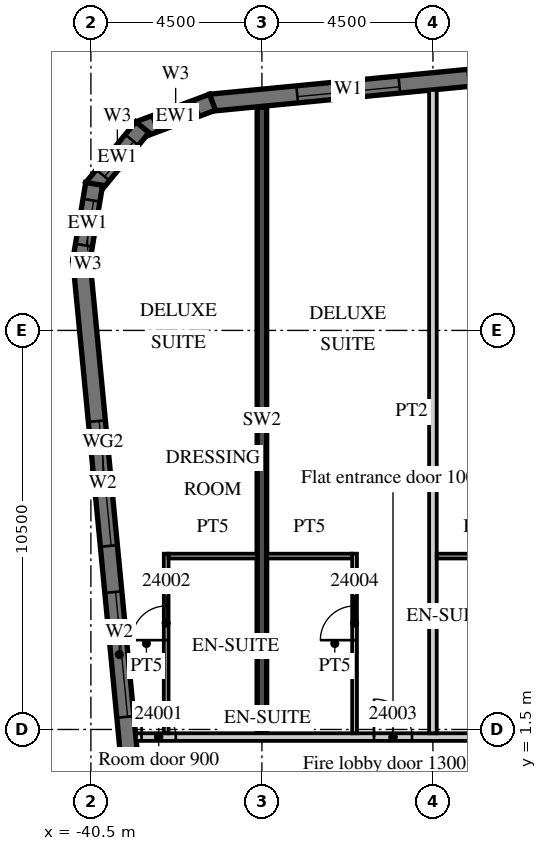
"""IFC4 building model, lengths in metres.
Left out: names, types, materials, properties, quantities, classifications, styles, units other than length and angle.
Written with IfcOpenShell. Run it as: python <this file> out.ifc"""

import sys

from ifc_helpers import new_model, si_unit, direction, frame, frame_2d, origin, place, context, subcontext, project, spatial, polyline, rectangle, outline, extrude, element, fill, save


model = new_model("IFC4")
c1 = context("Model", 3, precision=1e-05, world=origin(), true_north=direction((0.0, 1.0)))
c2 = subcontext(c1, "Body", "Model", "MODEL_VIEW")
j1 = project(units=[si_unit("LENGTHUNIT", "METRE"), si_unit("PLANEANGLEUNIT", "RADIAN")], contexts=[c1])
p1 = place(None, origin())
s1 = spatial("IfcSite", under=j1, at=p1, CompositionType="ELEMENT")
p2 = place(p1, origin())
s2 = spatial("IfcBuilding", under=s1, at=p2, CompositionType="ELEMENT")
p3 = place(p2, frame((0.0, 0.0, 114.1)))
s3 = spatial("IfcBuildingStorey", under=s2, at=p3, CompositionType="ELEMENT", Elevation=114.1)
p4 = place(p3, frame((-36.0, 1.4, 0.0), z_axis=(0.0, 0.0, 1.0), x_axis=(0.0, 1.0, 0.0)))
e1 = element("IfcWall", 1, at=p4, inside=s3, PredefinedType="SHEAR", context=c2, shape_type="SweptSolid", body=[
    extrude(rectangle(XDim=16.474, YDim=0.25, at=frame_2d((8.237, 0.0))), origin(), (0.0, 0.0, 1.0), 3.3),
])
p5 = place(p3, frame((-40.753, 13.872, 0.0), z_axis=(0.0, 0.0, 1.0), x_axis=(0.095843327381, -0.995396431878, 0.0)))
e2 = element("IfcWall", 2, at=p5, inside=s3, PredefinedType="SOLIDWALL", context=c2, shape_type="SweptSolid", body=[
    extrude(rectangle(XDim=35.0, YDim=0.45, at=frame_2d((17.5, 0.0))), origin(), (0.0, 0.0, 1.0), 3.02),
])
p6 = place(p5, frame((4.277, 0.0, 0.45)))
e3 = element("IfcOpeningElement", 3, at=p6, cuts=e2, PredefinedType="OPENING", context=c2, shape_type="SweptSolid", body=[
    extrude(rectangle(XDim=3.3, YDim=2.25, at=frame_2d((1.65, 1.125))), frame((0.0, 0.235, 0.0), z_axis=(0.0, -1.0, 0.0), x_axis=(1.0, 0.0, 0.0)), (0.0, 0.0, 1.0), 0.47),
])
p7 = place(p5, frame((8.798, 0.0, 0.45)))
e4 = element("IfcOpeningElement", 4, at=p7, cuts=e2, PredefinedType="OPENING", context=c2, shape_type="SweptSolid", body=[
    extrude(rectangle(XDim=3.3, YDim=2.25, at=frame_2d((1.65, 1.125))), frame((0.0, 0.235, 0.0), z_axis=(0.0, -1.0, 0.0), x_axis=(1.0, 0.0, 0.0)), (0.0, 0.0, 1.0), 0.47),
])
p8 = place(p3, frame((13.521, 22.89, 0.0), z_axis=(0.0, 0.0, 1.0), x_axis=(-0.995396445054, -0.095843190545, 0.0)))
e5 = element("IfcWall", 5, at=p8, inside=s3, PredefinedType="SOLIDWALL", context=c2, shape_type="SweptSolid", body=[
    extrude(rectangle(XDim=51.114, YDim=0.45, at=frame_2d((25.557, 0.0))), origin(), (0.0, 0.0, 1.0), 3.02),
])
p9 = place(p8, frame((0.91, 0.0, 0.45)))
e6 = element("IfcOpeningElement", 6, at=p9, cuts=e5, PredefinedType="OPENING", context=c2, shape_type="SweptSolid", body=[
    extrude(rectangle(XDim=2.7, YDim=2.25, at=frame_2d((1.35, 1.125))), frame((0.0, 0.235, 0.0), z_axis=(0.0, -1.0, 0.0), x_axis=(1.0, 0.0, 0.0)), (0.0, 0.0, 1.0), 0.47),
])
p10 = place(p8, frame((5.431, 0.0, 0.45)))
e7 = element("IfcOpeningElement", 7, at=p10, cuts=e5, PredefinedType="OPENING", context=c2, shape_type="SweptSolid", body=[
    extrude(rectangle(XDim=2.7, YDim=2.25, at=frame_2d((1.35, 1.125))), frame((0.0, 0.235, 0.0), z_axis=(0.0, -1.0, 0.0), x_axis=(1.0, 0.0, 0.0)), (0.0, 0.0, 1.0), 0.47),
])
p11 = place(p8, frame((9.952, 0.0, 0.45)))
e8 = element("IfcOpeningElement", 8, at=p11, cuts=e5, PredefinedType="OPENING", context=c2, shape_type="SweptSolid", body=[
    extrude(rectangle(XDim=2.7, YDim=2.25, at=frame_2d((1.35, 1.125))), frame((0.0, 0.235, 0.0), z_axis=(0.0, -1.0, 0.0), x_axis=(1.0, 0.0, 0.0)), (0.0, 0.0, 1.0), 0.47),
])
p12 = place(p8, frame((14.473, 0.0, 0.45)))
e9 = element("IfcOpeningElement", 9, at=p12, cuts=e5, PredefinedType="OPENING", context=c2, shape_type="SweptSolid", body=[
    extrude(rectangle(XDim=2.7, YDim=2.25, at=frame_2d((1.35, 1.125))), frame((0.0, 0.235, 0.0), z_axis=(0.0, -1.0, 0.0), x_axis=(1.0, 0.0, 0.0)), (0.0, 0.0, 1.0), 0.47),
])
p13 = place(p8, frame((18.994, 0.0, 0.45)))
e10 = element("IfcOpeningElement", 10, at=p13, cuts=e5, PredefinedType="OPENING", context=c2, shape_type="SweptSolid", body=[
    extrude(rectangle(XDim=2.7, YDim=2.25, at=frame_2d((1.35, 1.125))), frame((0.0, 0.235, 0.0), z_axis=(0.0, -1.0, 0.0), x_axis=(1.0, 0.0, 0.0)), (0.0, 0.0, 1.0), 0.47),
])
p14 = place(p8, frame((23.514, 0.0, 0.45)))
e11 = element("IfcOpeningElement", 11, at=p14, cuts=e5, PredefinedType="OPENING", context=c2, shape_type="SweptSolid", body=[
    extrude(rectangle(XDim=2.7, YDim=2.25, at=frame_2d((1.35, 1.125))), frame((0.0, 0.235, 0.0), z_axis=(0.0, -1.0, 0.0), x_axis=(1.0, 0.0, 0.0)), (0.0, 0.0, 1.0), 0.47),
])
p15 = place(p8, frame((28.035, 0.0, 0.45)))
e12 = element("IfcOpeningElement", 12, at=p15, cuts=e5, PredefinedType="OPENING", context=c2, shape_type="SweptSolid", body=[
    extrude(rectangle(XDim=2.7, YDim=2.25, at=frame_2d((1.35, 1.125))), frame((0.0, 0.235, 0.0), z_axis=(0.0, -1.0, 0.0), x_axis=(1.0, 0.0, 0.0)), (0.0, 0.0, 1.0), 0.47),
])
p16 = place(p8, frame((32.556, 0.0, 0.45)))
e13 = element("IfcOpeningElement", 13, at=p16, cuts=e5, PredefinedType="OPENING", context=c2, shape_type="SweptSolid", body=[
    extrude(rectangle(XDim=2.7, YDim=2.25, at=frame_2d((1.35, 1.125))), frame((0.0, 0.235, 0.0), z_axis=(0.0, -1.0, 0.0), x_axis=(1.0, 0.0, 0.0)), (0.0, 0.0, 1.0), 0.47),
])
p17 = place(p8, frame((37.077, 0.0, 0.45)))
e14 = element("IfcOpeningElement", 14, at=p17, cuts=e5, PredefinedType="OPENING", context=c2, shape_type="SweptSolid", body=[
    extrude(rectangle(XDim=2.7, YDim=2.25, at=frame_2d((1.35, 1.125))), frame((0.0, 0.235, 0.0), z_axis=(0.0, -1.0, 0.0), x_axis=(1.0, 0.0, 0.0)), (0.0, 0.0, 1.0), 0.47),
])
p18 = place(p8, frame((41.598, 0.0, 0.45)))
e15 = element("IfcOpeningElement", 15, at=p18, cuts=e5, PredefinedType="OPENING", context=c2, shape_type="SweptSolid", body=[
    extrude(rectangle(XDim=2.7, YDim=2.25, at=frame_2d((1.35, 1.125))), frame((0.0, 0.235, 0.0), z_axis=(0.0, -1.0, 0.0), x_axis=(1.0, 0.0, 0.0)), (0.0, 0.0, 1.0), 0.47),
])
p19 = place(p8, frame((46.118, 0.0, 0.45)))
e16 = element("IfcOpeningElement", 16, at=p19, cuts=e5, PredefinedType="OPENING", context=c2, shape_type="SweptSolid", body=[
    extrude(rectangle(XDim=2.7, YDim=2.25, at=frame_2d((1.35, 1.125))), frame((0.0, 0.235, 0.0), z_axis=(0.0, -1.0, 0.0), x_axis=(1.0, 0.0, 0.0)), (0.0, 0.0, 1.0), 0.47),
])
p20 = place(p3, frame((-37.3, 18.004, 0.0), z_axis=(0.0, 0.0, 1.0), x_axis=(-0.936677599948, -0.350192909346, 0.0)))
e17 = element("IfcWall", 17, at=p20, inside=s3, PredefinedType="SOLIDWALL", context=c2, shape_type="SweptSolid", body=[
    extrude(outline(polyline([(0.0, -0.225), (2.071, -0.225), (1.95, 0.225), (0.121, 0.225), (0.0, -0.225)])), origin(), (0.0, 0.0, 1.0), 3.02),
])
p21 = place(p20, frame((0.435, 0.0, 0.45)))
e18 = element("IfcOpeningElement", 18, at=p21, cuts=e17, PredefinedType="OPENING", context=c2, shape_type="SweptSolid", body=[
    extrude(rectangle(XDim=1.2, YDim=2.25, at=frame_2d((0.6, 1.125))), frame((0.0, 0.235, 0.0), z_axis=(0.0, -1.0, 0.0), x_axis=(1.0, 0.0, 0.0)), (0.0, 0.0, 1.0), 0.47),
])
p22 = place(p3, frame((-39.145, 17.347, 0.0), z_axis=(0.0, 0.0, 1.0), x_axis=(-0.636046112757, -0.771651049663, 0.0)))
e19 = element("IfcWall", 19, at=p22, inside=s3, PredefinedType="SOLIDWALL", context=c2, shape_type="SweptSolid", body=[
    extrude(outline(polyline([(0.0, -0.225), (2.071, -0.225), (1.95, 0.225), (0.121, 0.225), (0.0, -0.225)])), origin(), (0.0, 0.0, 1.0), 3.02),
])
p23 = place(p22, frame((0.435, 0.0, 0.45)))
e20 = element("IfcOpeningElement", 20, at=p23, cuts=e19, PredefinedType="OPENING", context=c2, shape_type="SweptSolid", body=[
    extrude(rectangle(XDim=1.2, YDim=2.25, at=frame_2d((0.6, 1.125))), frame((0.0, 0.235, 0.0), z_axis=(0.0, -1.0, 0.0), x_axis=(1.0, 0.0, 0.0)), (0.0, 0.0, 1.0), 0.47),
])
p24 = place(p3, frame((-40.413, 15.855, 0.0), z_axis=(0.0, 0.0, 1.0), x_axis=(-0.165068144653, -0.986282164302, 0.0)))
e21 = element("IfcWall", 21, at=p24, inside=s3, PredefinedType="SOLIDWALL", context=c2, shape_type="SweptSolid", body=[
    extrude(outline(polyline([(0.0, -0.225), (2.071, -0.225), (1.95, 0.225), (0.121, 0.225), (0.0, -0.225)])), origin(), (0.0, 0.0, 1.0), 3.02),
])
p25 = place(p24, frame((0.435, 0.0, 0.45)))
e22 = element("IfcOpeningElement", 22, at=p25, cuts=e21, PredefinedType="OPENING", context=c2, shape_type="SweptSolid", body=[
    extrude(rectangle(XDim=1.2, YDim=2.25, at=frame_2d((0.6, 1.125))), frame((0.0, 0.235, 0.0), z_axis=(0.0, -1.0, 0.0), x_axis=(1.0, 0.0, 0.0)), (0.0, 0.0, 1.0), 0.47),
])
p26 = place(p3, frame((-39.316, 1.3, 0.0), z_axis=(0.0, 0.0, 1.0), x_axis=(1.0, 0.0, 0.0)))
e23 = element("IfcWall", 23, at=p26, inside=s3, PredefinedType="PARTITIONING", context=c2, shape_type="SweptSolid", body=[
    extrude(rectangle(XDim=52.816, YDim=0.2, at=frame_2d((26.408, 0.0))), origin(), (0.0, 0.0, 1.0), 3.02),
])
p27 = place(p26, frame((0.15, 0.0, 0.0)))
e24 = element("IfcOpeningElement", 24, at=p27, cuts=e23, PredefinedType="OPENING", context=c2, shape_type="SweptSolid", body=[
    extrude(rectangle(XDim=0.9, YDim=2.1, at=frame_2d((0.45, 1.05))), frame((0.0, 0.11, 0.0), z_axis=(0.0, -1.0, 0.0), x_axis=(1.0, 0.0, 0.0)), (0.0, 0.0, 1.0), 0.22),
])
p28 = place(p26, frame((6.266, 0.0, 0.0)))
e25 = element("IfcOpeningElement", 25, at=p28, cuts=e23, PredefinedType="OPENING", context=c2, shape_type="SweptSolid", body=[
    extrude(rectangle(XDim=1.0, YDim=2.1, at=frame_2d((0.5, 1.05))), frame((0.0, 0.11, 0.0), z_axis=(0.0, -1.0, 0.0), x_axis=(1.0, 0.0, 0.0)), (0.0, 0.0, 1.0), 0.22),
])
p29 = place(p26, frame((10.741, 0.0, 0.0)))
e26 = element("IfcOpeningElement", 26, at=p29, cuts=e23, PredefinedType="OPENING", context=c2, shape_type="SweptSolid", body=[
    extrude(rectangle(XDim=1.0, YDim=2.1, at=frame_2d((0.5, 1.05))), frame((0.0, 0.11, 0.0), z_axis=(0.0, -1.0, 0.0), x_axis=(1.0, 0.0, 0.0)), (0.0, 0.0, 1.0), 0.22),
])
p30 = place(p26, frame((17.678, 0.0, 0.0)))
e27 = element("IfcOpeningElement", 27, at=p30, cuts=e23, PredefinedType="OPENING", context=c2, shape_type="SweptSolid", body=[
    extrude(rectangle(XDim=1.2, YDim=2.1, at=frame_2d((0.6, 1.05))), frame((0.0, 0.11, 0.0), z_axis=(0.0, -1.0, 0.0), x_axis=(1.0, 0.0, 0.0)), (0.0, 0.0, 1.0), 0.22),
])
p31 = place(p26, frame((26.678, 0.0, 0.0)))
e28 = element("IfcOpeningElement", 28, at=p31, cuts=e23, PredefinedType="OPENING", context=c2, shape_type="SweptSolid", body=[
    extrude(rectangle(XDim=1.2, YDim=2.1, at=frame_2d((0.6, 1.05))), frame((0.0, 0.11, 0.0), z_axis=(0.0, -1.0, 0.0), x_axis=(1.0, 0.0, 0.0)), (0.0, 0.0, 1.0), 0.22),
])
p32 = place(p26, frame((35.678, 0.0, 0.0)))
e29 = element("IfcOpeningElement", 29, at=p32, cuts=e23, PredefinedType="OPENING", context=c2, shape_type="SweptSolid", body=[
    extrude(rectangle(XDim=1.2, YDim=2.1, at=frame_2d((0.6, 1.05))), frame((0.0, 0.11, 0.0), z_axis=(0.0, -1.0, 0.0), x_axis=(1.0, 0.0, 0.0)), (0.0, 0.0, 1.0), 0.22),
])
p33 = place(p26, frame((41.754, 0.0, 0.0)))
e30 = element("IfcOpeningElement", 30, at=p33, cuts=e23, PredefinedType="OPENING", context=c2, shape_type="SweptSolid", body=[
    extrude(rectangle(XDim=1.2, YDim=2.1, at=frame_2d((0.6, 1.05))), frame((0.0, 0.11, 0.0), z_axis=(0.0, -1.0, 0.0), x_axis=(1.0, 0.0, 0.0)), (0.0, 0.0, 1.0), 0.22),
])
p34 = place(p26, frame((51.241, 0.0, 0.0)))
e31 = element("IfcOpeningElement", 31, at=p34, cuts=e23, PredefinedType="OPENING", context=c2, shape_type="SweptSolid", body=[
    extrude(rectangle(XDim=1.0, YDim=2.1, at=frame_2d((0.5, 1.05))), frame((0.0, 0.11, 0.0), z_axis=(0.0, -1.0, 0.0), x_axis=(1.0, 0.0, 0.0)), (0.0, 0.0, 1.0), 0.22),
])
p35 = place(p3, frame((-38.519, 1.4, 0.0), z_axis=(0.0, 0.0, 1.0), x_axis=(0.0, 1.0, 0.0)))
e32 = element("IfcWall", 32, at=p35, inside=s3, PredefinedType="PARTITIONING", context=c2, shape_type="SweptSolid", body=[
    extrude(rectangle(XDim=4.725, YDim=0.125, at=frame_2d((2.363, 0.0))), origin(), (0.0, 0.0, 1.0), 3.02),
])
p36 = place(p35, frame((2.45, 0.0, 0.0)))
e33 = element("IfcOpeningElement", 33, at=p36, cuts=e32, PredefinedType="OPENING", context=c2, shape_type="SweptSolid", body=[
    extrude(rectangle(XDim=0.9, YDim=2.1, at=frame_2d((0.45, 1.05))), frame((0.0, 0.073, 0.0), z_axis=(0.0, -1.0, 0.0), x_axis=(1.0, 0.0, 0.0)), (0.0, 0.0, 1.0), 0.145),
])
p37 = place(p3, frame((-38.457, 6.062, 0.0), z_axis=(0.0, 0.0, 1.0), x_axis=(1.0, 0.0, 0.0)))
e34 = element("IfcWall", 34, at=p37, inside=s3, PredefinedType="PARTITIONING", context=c2, shape_type="SweptSolid", body=[
    extrude(rectangle(XDim=2.332, YDim=0.125, at=frame_2d((1.166, 0.0))), origin(), (0.0, 0.0, 1.0), 3.02),
])
p38 = place(p3, frame((-31.5, 1.4, 0.0), z_axis=(0.0, 0.0, 1.0), x_axis=(0.0, 1.0, 0.0)))
e35 = element("IfcWall", 35, at=p38, inside=s3, PredefinedType="PARTITIONING", context=c2, shape_type="SweptSolid", body=[
    extrude(rectangle(XDim=16.929, YDim=0.2, at=frame_2d((8.465, 0.0))), origin(), (0.0, 0.0, 1.0), 3.02),
])
p39 = place(p3, frame((-33.562, 1.4, 0.0), z_axis=(0.0, 0.0, 1.0), x_axis=(0.0, 1.0, 0.0)))
e36 = element("IfcWall", 36, at=p39, inside=s3, PredefinedType="PARTITIONING", context=c2, shape_type="SweptSolid", body=[
    extrude(rectangle(XDim=4.725, YDim=0.125, at=frame_2d((2.363, 0.0))), origin(), (0.0, 0.0, 1.0), 3.02),
])
p40 = place(p39, frame((2.45, 0.0, 0.0)))
e37 = element("IfcOpeningElement", 37, at=p40, cuts=e36, PredefinedType="OPENING", context=c2, shape_type="SweptSolid", body=[
    extrude(rectangle(XDim=0.9, YDim=2.1, at=frame_2d((0.45, 1.05))), frame((0.0, 0.073, 0.0), z_axis=(0.0, -1.0, 0.0), x_axis=(1.0, 0.0, 0.0)), (0.0, 0.0, 1.0), 0.145),
])
for number, where, z_axis, x_axis in (
    (38, (-35.875, 6.062, 0.0), (0.0, 0.0, 1.0), (1.0, 0.0, 0.0)),
    (39, (-31.4, 6.062, 0.0), (0.0, 0.0, 1.0), (1.0, 0.0, 0.0)),
):
    element("IfcWall", number, at=place(p3, frame(where, z_axis=z_axis, x_axis=x_axis)), inside=s3, PredefinedType="PARTITIONING", context=c2, shape_type="SweptSolid", body=[
        extrude(rectangle(XDim=2.25, YDim=0.125, at=frame_2d((1.125, 0.0))), origin(), (0.0, 0.0, 1.0), 3.02),
    ])
p41 = place(p6, origin())
e40 = element("IfcWindow", 40, at=p41, inside=s3, PartitioningType="SINGLE_PANEL", PredefinedType="WINDOW", context=c2, shape_type="SweptSolid", body=[
    extrude(rectangle(XDim=3.3, YDim=2.25, at=frame_2d((1.65, 1.125))), frame((0.0, 0.09, 0.0), z_axis=(0.0, -1.0, 0.0), x_axis=(1.0, 0.0, 0.0)), (0.0, 0.0, 1.0), 0.06),
])
fill(e3, e40)
p42 = place(p7, origin())
e41 = element("IfcWindow", 41, at=p42, inside=s3, PartitioningType="SINGLE_PANEL", PredefinedType="WINDOW", context=c2, shape_type="SweptSolid", body=[
    extrude(rectangle(XDim=3.3, YDim=2.25, at=frame_2d((1.65, 1.125))), frame((0.0, 0.09, 0.0), z_axis=(0.0, -1.0, 0.0), x_axis=(1.0, 0.0, 0.0)), (0.0, 0.0, 1.0), 0.06),
])
fill(e4, e41)
p43 = place(p19, origin())
e42 = element("IfcWindow", 42, at=p43, inside=s3, PartitioningType="SINGLE_PANEL", PredefinedType="WINDOW", context=c2, shape_type="SweptSolid", body=[
    extrude(rectangle(XDim=2.7, YDim=2.25, at=frame_2d((1.35, 1.125))), frame((0.0, 0.09, 0.0), z_axis=(0.0, -1.0, 0.0), x_axis=(1.0, 0.0, 0.0)), (0.0, 0.0, 1.0), 0.06),
])
fill(e16, e42)
p44 = place(p21, origin())
e43 = element("IfcWindow", 43, at=p44, inside=s3, PartitioningType="SINGLE_PANEL", PredefinedType="WINDOW", context=c2, shape_type="SweptSolid", body=[
    extrude(rectangle(XDim=1.2, YDim=2.25, at=frame_2d((0.6, 1.125))), frame((0.0, 0.09, 0.0), z_axis=(0.0, -1.0, 0.0), x_axis=(1.0, 0.0, 0.0)), (0.0, 0.0, 1.0), 0.06),
])
fill(e18, e43)
p45 = place(p23, origin())
e44 = element("IfcWindow", 44, at=p45, inside=s3, PartitioningType="SINGLE_PANEL", PredefinedType="WINDOW", context=c2, shape_type="SweptSolid", body=[
    extrude(rectangle(XDim=1.2, YDim=2.25, at=frame_2d((0.6, 1.125))), frame((0.0, 0.09, 0.0), z_axis=(0.0, -1.0, 0.0), x_axis=(1.0, 0.0, 0.0)), (0.0, 0.0, 1.0), 0.06),
])
fill(e20, e44)
p46 = place(p25, origin())
e45 = element("IfcWindow", 45, at=p46, inside=s3, PartitioningType="SINGLE_PANEL", PredefinedType="WINDOW", context=c2, shape_type="SweptSolid", body=[
    extrude(rectangle(XDim=1.2, YDim=2.25, at=frame_2d((0.6, 1.125))), frame((0.0, 0.09, 0.0), z_axis=(0.0, -1.0, 0.0), x_axis=(1.0, 0.0, 0.0)), (0.0, 0.0, 1.0), 0.06),
])
fill(e22, e45)
p47 = place(p27, origin())
e46 = element("IfcDoor", 46, at=p47, inside=s3, OperationType="SINGLE_SWING_LEFT", PredefinedType="DOOR", context=c2, shape_type="SweptSolid", body=[
    extrude(rectangle(XDim=0.9, YDim=2.1, at=frame_2d((0.45, 1.05))), frame((0.0, 0.025, 0.0), z_axis=(0.0, -1.0, 0.0), x_axis=(1.0, 0.0, 0.0)), (0.0, 0.0, 1.0), 0.05),
])
fill(e24, e46)
p48 = place(p36, origin())
e47 = element("IfcDoor", 47, at=p48, inside=s3, OperationType="SINGLE_SWING_LEFT", PredefinedType="DOOR", context=c2, shape_type="SweptSolid", body=[
    extrude(rectangle(XDim=0.9, YDim=2.1, at=frame_2d((0.45, 1.05))), frame((0.0, 0.025, 0.0), z_axis=(0.0, -1.0, 0.0), x_axis=(1.0, 0.0, 0.0)), (0.0, 0.0, 1.0), 0.05),
])
fill(e33, e47)
p49 = place(p28, origin())
e48 = element("IfcDoor", 48, at=p49, inside=s3, OperationType="SINGLE_SWING_LEFT", PredefinedType="DOOR", context=c2, shape_type="SweptSolid", body=[
    extrude(rectangle(XDim=1.0, YDim=2.1, at=frame_2d((0.5, 1.05))), frame((0.0, 0.025, 0.0), z_axis=(0.0, -1.0, 0.0), x_axis=(1.0, 0.0, 0.0)), (0.0, 0.0, 1.0), 0.05),
])
fill(e25, e48)
p50 = place(p40, origin())
e49 = element("IfcDoor", 49, at=p50, inside=s3, OperationType="SINGLE_SWING_LEFT", PredefinedType="DOOR", context=c2, shape_type="SweptSolid", body=[
    extrude(rectangle(XDim=0.9, YDim=2.1, at=frame_2d((0.45, 1.05))), frame((0.0, 0.025, 0.0), z_axis=(0.0, -1.0, 0.0), x_axis=(1.0, 0.0, 0.0)), (0.0, 0.0, 1.0), 0.05),
])
fill(e37, e49)
save(model, sys.argv[1])
